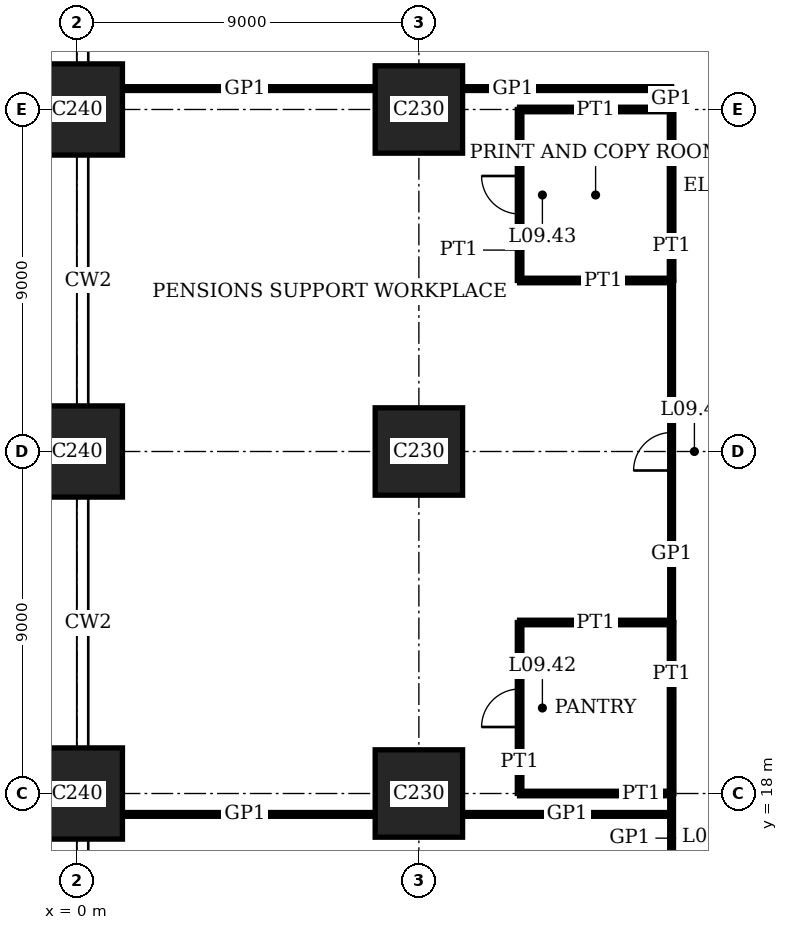
"""IFC4 building model, lengths in metres.
Left out: names, types, materials, properties, quantities, classifications, styles, units other than length and angle.
Written with IfcOpenShell. Run it as: python <this file> out.ifc"""

import sys

from ifc_helpers import new_model, si_unit, direction, frame, frame_2d, origin, origin_2d, place, context, subcontext, project, spatial, rectangle, extrude, element, fill, save


model = new_model("IFC4")
c1 = context("Model", 3, precision=1e-05, world=origin(), true_north=direction((0.0, 1.0)))
c2 = subcontext(c1, "Body", "Model", "MODEL_VIEW")
j1 = project(units=[si_unit("LENGTHUNIT", "METRE"), si_unit("PLANEANGLEUNIT", "RADIAN")], contexts=[c1])
p1 = place(None, origin())
s1 = spatial("IfcSite", under=j1, at=p1, CompositionType="ELEMENT")
p2 = place(p1, origin())
s2 = spatial("IfcBuilding", under=s1, at=p2, CompositionType="ELEMENT")
p3 = place(p2, frame((0.0, 0.0, 39.8)))
s3 = spatial("IfcBuildingStorey", under=s2, at=p3, CompositionType="ELEMENT", Elevation=39.8)
for number, where, z_axis, x_axis in (
    (1, (0.0, 18.0, 0.0), (0.0, 0.0, 1.0), (1.0, 0.0, 0.0)),
    (2, (0.0, 27.0, 0.0), (0.0, 0.0, 1.0), (1.0, 0.0, 0.0)),
    (3, (0.0, 36.0, 0.0), (0.0, 0.0, 1.0), (1.0, 0.0, 0.0)),
):
    element("IfcColumn", number, at=place(p3, frame(where, z_axis=z_axis, x_axis=x_axis)), inside=s3, PredefinedType="COLUMN", context=c2, shape_type="SweptSolid", body=[
        extrude(rectangle(XDim=2.4, YDim=2.4, at=origin_2d()), origin(), (0.0, 0.0, 1.0), 4.0),
    ])
for number, where, z_axis, x_axis in (
    (4, (9.0, 18.0, 0.0), (0.0, 0.0, 1.0), (1.0, 0.0, 0.0)),
    (5, (9.0, 27.0, 0.0), (0.0, 0.0, 1.0), (1.0, 0.0, 0.0)),
    (6, (9.0, 36.0, 0.0), (0.0, 0.0, 1.0), (1.0, 0.0, 0.0)),
):
    element("IfcColumn", number, at=place(p3, frame(where, z_axis=z_axis, x_axis=x_axis)), inside=s3, PredefinedType="COLUMN", context=c2, shape_type="SweptSolid", body=[
        extrude(rectangle(XDim=2.3, YDim=2.3, at=origin_2d()), origin(), (0.0, 0.0, 1.0), 4.0),
    ])
p4 = place(p3, frame((1.2, 17.45, 0.0), z_axis=(0.0, 0.0, 1.0), x_axis=(1.0, 0.0, 0.0)))
e7 = element("IfcWall", 7, at=p4, inside=s3, PredefinedType="PARTITIONING", context=c2, shape_type="SweptSolid", body=[
    extrude(rectangle(XDim=6.65, YDim=0.1, at=frame_2d((3.325, 0.0))), origin(), (0.0, 0.0, 1.0), 3.75),
])
p5 = place(p3, frame((10.15, 17.45, 0.0), z_axis=(0.0, 0.0, 1.0), x_axis=(1.0, 0.0, 0.0)))
e8 = element("IfcWall", 8, at=p5, inside=s3, PredefinedType="PARTITIONING", context=c2, shape_type="SweptSolid", body=[
    extrude(rectangle(XDim=5.5, YDim=0.1, at=frame_2d((2.75, 0.0))), origin(), (0.0, 0.0, 1.0), 3.75),
])
p6 = place(p3, frame((11.65, 18.0, 0.0), z_axis=(0.0, 0.0, 1.0), x_axis=(1.0, 0.0, 0.0)))
e9 = element("IfcWall", 9, at=p6, inside=s3, PredefinedType="PARTITIONING", context=c2, shape_type="SweptSolid", body=[
    extrude(rectangle(XDim=4.0, YDim=0.12, at=frame_2d((2.0, 0.0))), origin(), (0.0, 0.0, 1.0), 3.05),
])
for number, where, z_axis, x_axis in (
    (10, (11.65, 22.5, 0.0), (0.0, 0.0, 1.0), (1.0, 0.0, 0.0)),
    (11, (11.65, 31.5, 0.0), (0.0, 0.0, 1.0), (1.0, 0.0, 0.0)),
):
    element("IfcWall", number, at=place(p3, frame(where, z_axis=z_axis, x_axis=x_axis)), inside=s3, PredefinedType="PARTITIONING", context=c2, shape_type="SweptSolid", body=[
        extrude(rectangle(XDim=4.0, YDim=0.12, at=frame_2d((2.0, 0.0))), origin(), (0.0, 0.0, 1.0), 3.1),
    ])
p7 = place(p3, frame((11.65, 36.0, 0.0), z_axis=(0.0, 0.0, 1.0), x_axis=(1.0, 0.0, 0.0)))
e12 = element("IfcWall", 12, at=p7, inside=s3, PredefinedType="PARTITIONING", context=c2, shape_type="SweptSolid", body=[
    extrude(rectangle(XDim=4.0, YDim=0.12, at=frame_2d((2.0, 0.0))), origin(), (0.0, 0.0, 1.0), 3.05),
])
p8 = place(p3, frame((1.2, 36.55, 0.0), z_axis=(0.0, 0.0, 1.0), x_axis=(1.0, 0.0, 0.0)))
e13 = element("IfcWall", 13, at=p8, inside=s3, PredefinedType="PARTITIONING", context=c2, shape_type="SweptSolid", body=[
    extrude(rectangle(XDim=6.65, YDim=0.1, at=frame_2d((3.325, 0.0))), origin(), (0.0, 0.0, 1.0), 3.75),
])
p9 = place(p3, frame((10.15, 36.55, 0.0), z_axis=(0.0, 0.0, 1.0), x_axis=(1.0, 0.0, 0.0)))
e14 = element("IfcWall", 14, at=p9, inside=s3, PredefinedType="PARTITIONING", context=c2, shape_type="SweptSolid", body=[
    extrude(rectangle(XDim=5.5, YDim=0.1, at=frame_2d((2.75, 0.0))), origin(), (0.0, 0.0, 1.0), 3.75),
])
p10 = place(p3, frame((11.65, 18.0, 0.0), z_axis=(0.0, 0.0, 1.0), x_axis=(0.0, 1.0, 0.0)))
e15 = element("IfcWall", 15, at=p10, inside=s3, PredefinedType="PARTITIONING", context=c2, shape_type="SweptSolid", body=[
    extrude(rectangle(XDim=4.5, YDim=0.12, at=frame_2d((2.25, 0.0))), origin(), (0.0, 0.0, 1.0), 3.75),
])
p11 = place(p10, frame((1.75, 0.0, 0.0)))
e16 = element("IfcOpeningElement", 16, at=p11, cuts=e15, PredefinedType="OPENING", context=c2, shape_type="SweptSolid", body=[
    extrude(rectangle(XDim=1.0, YDim=2.4, at=frame_2d((0.5, 1.2))), frame((0.0, 0.07, 0.0), z_axis=(0.0, -1.0, 0.0), x_axis=(1.0, 0.0, 0.0)), (0.0, 0.0, 1.0), 0.14),
])
p12 = place(p3, frame((11.65, 31.5, 0.0), z_axis=(0.0, 0.0, 1.0), x_axis=(0.0, 1.0, 0.0)))
e17 = element("IfcWall", 17, at=p12, inside=s3, PredefinedType="PARTITIONING", context=c2, shape_type="SweptSolid", body=[
    extrude(rectangle(XDim=4.5, YDim=0.12, at=frame_2d((2.25, 0.0))), origin(), (0.0, 0.0, 1.0), 3.75),
])
p13 = place(p12, frame((1.75, 0.0, 0.0)))
e18 = element("IfcOpeningElement", 18, at=p13, cuts=e17, PredefinedType="OPENING", context=c2, shape_type="SweptSolid", body=[
    extrude(rectangle(XDim=1.0, YDim=2.4, at=frame_2d((0.5, 1.2))), frame((0.0, 0.07, 0.0), z_axis=(0.0, -1.0, 0.0), x_axis=(1.0, 0.0, 0.0)), (0.0, 0.0, 1.0), 0.14),
])
for number, where, z_axis, x_axis in (
    (19, (15.65, 18.0, 0.0), (0.0, 0.0, 1.0), (0.0, 1.0, 0.0)),
    (20, (15.65, 31.5, 0.0), (0.0, 0.0, 1.0), (0.0, 1.0, 0.0)),
):
    element("IfcWall", number, at=place(p3, frame(where, z_axis=z_axis, x_axis=x_axis)), inside=s3, PredefinedType="PARTITIONING", context=c2, shape_type="SweptSolid", body=[
        extrude(rectangle(XDim=4.5, YDim=0.12, at=frame_2d((2.25, 0.0))), origin(), (0.0, 0.0, 1.0), 3.75),
    ])
p14 = place(p3, frame((15.65, 15.65, 0.0), z_axis=(0.0, 0.0, 1.0), x_axis=(0.0, 1.0, 0.0)))
e21 = element("IfcWall", 21, at=p14, inside=s3, PredefinedType="PARTITIONING", context=c2, shape_type="SweptSolid", body=[
    extrude(rectangle(XDim=2.35, YDim=0.1, at=frame_2d((1.175, 0.0))), origin(), (0.0, 0.0, 1.0), 3.75),
])
p15 = place(p3, frame((15.65, 22.5, 0.0), z_axis=(0.0, 0.0, 1.0), x_axis=(0.0, 1.0, 0.0)))
e22 = element("IfcWall", 22, at=p15, inside=s3, PredefinedType="PARTITIONING", context=c2, shape_type="SweptSolid", body=[
    extrude(rectangle(XDim=9.0, YDim=0.1, at=frame_2d((4.5, 0.0))), origin(), (0.0, 0.0, 1.0), 3.75),
])
p16 = place(p15, frame((4.0, 0.0, 0.0)))
e23 = element("IfcOpeningElement", 23, at=p16, cuts=e22, PredefinedType="OPENING", context=c2, shape_type="SweptSolid", body=[
    extrude(rectangle(XDim=1.0, YDim=2.4, at=frame_2d((0.5, 1.2))), frame((0.0, 0.06, 0.0), z_axis=(0.0, -1.0, 0.0), x_axis=(1.0, 0.0, 0.0)), (0.0, 0.0, 1.0), 0.12),
])
p17 = place(p3, frame((15.65, 36.0, 0.0), z_axis=(0.0, 0.0, 1.0), x_axis=(0.0, 1.0, 0.0)))
e24 = element("IfcWall", 24, at=p17, inside=s3, PredefinedType="PARTITIONING", context=c2, shape_type="SweptSolid", body=[
    extrude(rectangle(XDim=0.55, YDim=0.1, at=frame_2d((0.275, 0.0))), origin(), (0.0, 0.0, 1.0), 3.75),
])
p18 = place(p11, origin())
e25 = element("IfcDoor", 25, at=p18, inside=s3, OperationType="SINGLE_SWING_RIGHT", PredefinedType="DOOR", context=c2, shape_type="SweptSolid", body=[
    extrude(rectangle(XDim=1.0, YDim=2.4, at=frame_2d((0.5, 1.2))), frame((0.0, 0.025, 0.0), z_axis=(0.0, -1.0, 0.0), x_axis=(1.0, 0.0, 0.0)), (0.0, 0.0, 1.0), 0.05),
])
fill(e16, e25)
p19 = place(p13, origin())
e26 = element("IfcDoor", 26, at=p19, inside=s3, OperationType="SINGLE_SWING_LEFT", PredefinedType="DOOR", context=c2, shape_type="SweptSolid", body=[
    extrude(rectangle(XDim=1.0, YDim=2.4, at=frame_2d((0.5, 1.2))), frame((0.0, 0.025, 0.0), z_axis=(0.0, -1.0, 0.0), x_axis=(1.0, 0.0, 0.0)), (0.0, 0.0, 1.0), 0.05),
])
fill(e18, e26)
p20 = place(p16, origin())
e27 = element("IfcDoor", 27, at=p20, inside=s3, OperationType="SINGLE_SWING_RIGHT", PredefinedType="DOOR", context=c2, shape_type="SweptSolid", body=[
    extrude(rectangle(XDim=1.0, YDim=2.4, at=frame_2d((0.5, 1.2))), frame((0.0, 0.02, 0.0), z_axis=(0.0, -1.0, 0.0), x_axis=(1.0, 0.0, 0.0)), (0.0, 0.0, 1.0), 0.04),
])
fill(e23, e27)
save(model, sys.argv[1])
